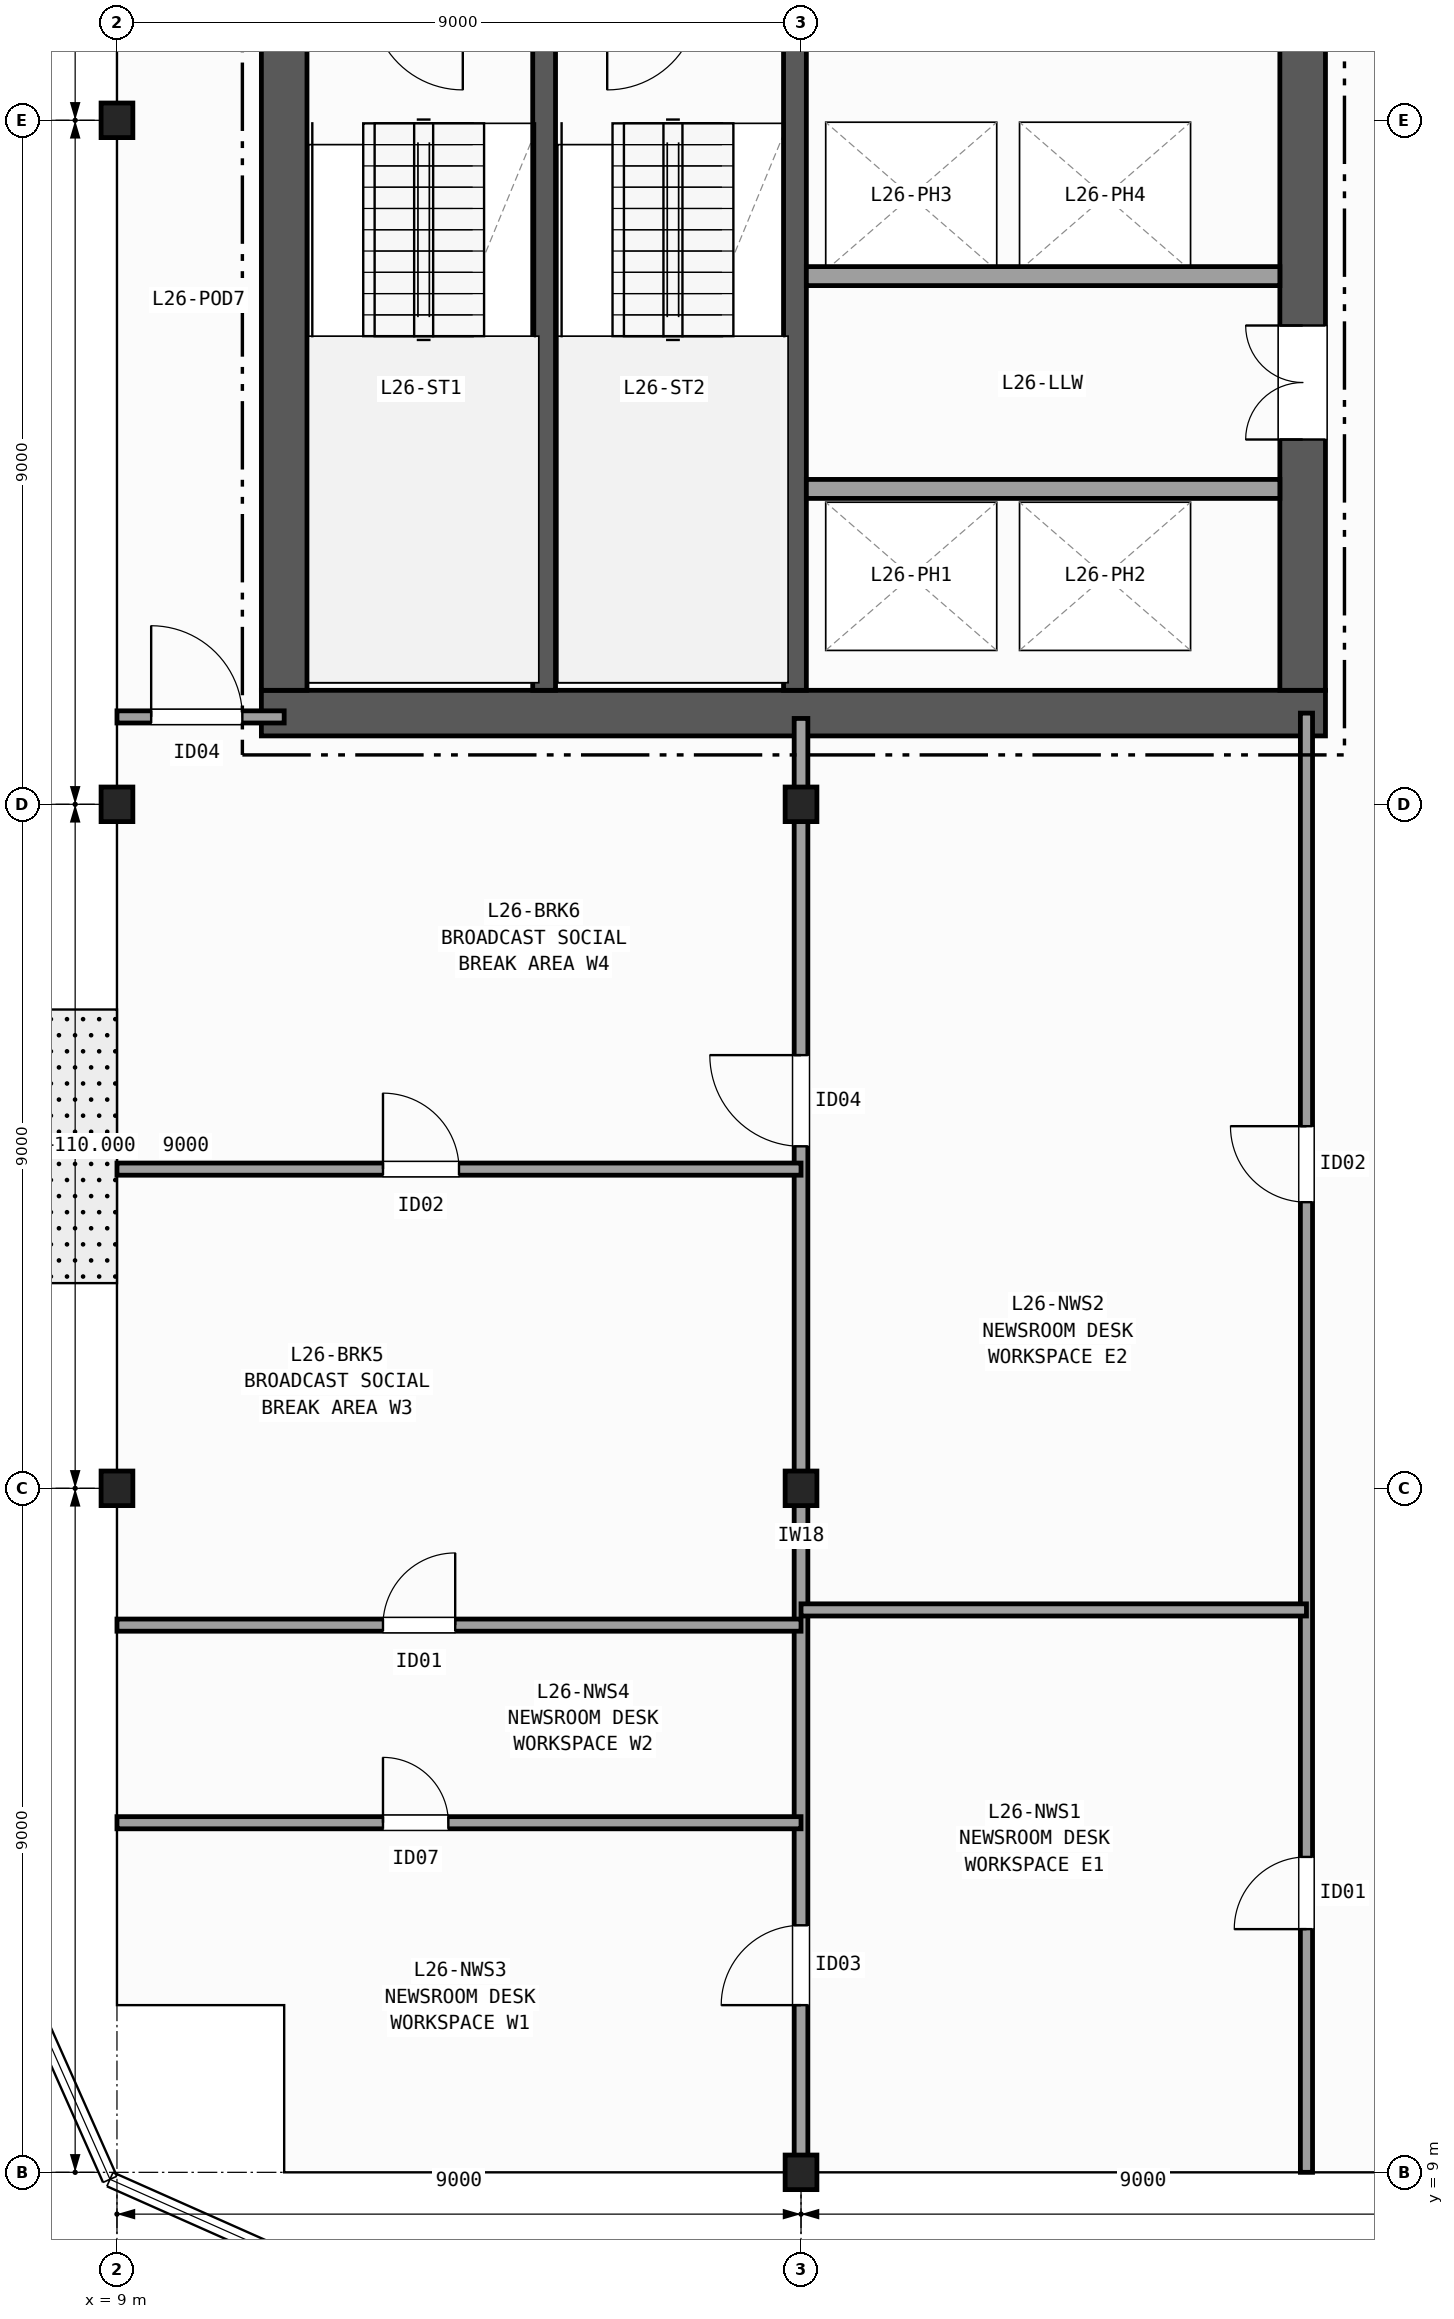
"""IFC4 building model, lengths in metres.
Left out: names, types, materials, properties, quantities, classifications, styles, units other than length and angle.
Written with IfcOpenShell. Run it as: python <this file> out.ifc"""

import sys

from ifc_helpers import new_model, si_unit, direction, frame, frame_2d, origin, origin_2d, place, context, subcontext, project, spatial, rectangle, i_section, extrude, element, fill, save


model = new_model("IFC4")
c1 = context("Model", 3, precision=1e-05, world=origin(), true_north=direction((0.0, 1.0)))
c2 = subcontext(c1, "Body", "Model", "MODEL_VIEW")
j1 = project(units=[si_unit("LENGTHUNIT", "METRE"), si_unit("PLANEANGLEUNIT", "RADIAN")], contexts=[c1])
p1 = place(None, origin())
s1 = spatial("IfcSite", under=j1, at=p1, CompositionType="ELEMENT")
p2 = place(p1, origin())
s2 = spatial("IfcBuilding", under=s1, at=p2, CompositionType="ELEMENT")
p3 = place(p2, frame((0.0, 0.0, 110.0)))
s3 = spatial("IfcBuildingStorey", under=s2, at=p3, CompositionType="ELEMENT", Elevation=110.0)
for number, where, z_axis, x_axis in (
    (1, (9.0, 18.0, 0.0), (0.0, 0.0, 1.0), (1.0, 0.0, 0.0)),
    (2, (9.0, 27.0, 0.0), (0.0, 0.0, 1.0), (1.0, 0.0, 0.0)),
    (3, (9.0, 36.0, 0.0), (0.0, 0.0, 1.0), (1.0, 0.0, 0.0)),
    (4, (18.0, 9.0, 0.0), (0.0, 0.0, 1.0), (1.0, 0.0, 0.0)),
    (5, (18.0, 18.0, 0.0), (0.0, 0.0, 1.0), (1.0, 0.0, 0.0)),
    (6, (18.0, 27.0, 0.0), (0.0, 0.0, 1.0), (1.0, 0.0, 0.0)),
):
    element("IfcColumn", number, at=place(p3, frame(where, z_axis=z_axis, x_axis=x_axis)), inside=s3, PredefinedType="COLUMN", context=c2, shape_type="SweptSolid", body=[
        extrude(i_section(OverallWidth=0.418, OverallDepth=0.455, WebThickness=0.042, FlangeThickness=0.068, FilletRadius=0.015, at=origin_2d()), origin(), (0.0, 0.0, 1.0), 3.7),
    ])
p4 = place(p3, frame((10.9, 28.2, 0.0), z_axis=(0.0, 0.0, 1.0), x_axis=(1.0, 0.0, 0.0)))
e7 = element("IfcWall", 7, at=p4, inside=s3, PredefinedType="SHEAR", context=c2, shape_type="SweptSolid", body=[
    extrude(rectangle(XDim=14.0, YDim=0.6, at=frame_2d((7.0, 0.0))), origin(), (0.0, 0.0, 1.0), 3.42),
])
p5 = place(p3, frame((11.2, 42.1, 0.0), z_axis=(0.0, 0.0, 1.0), x_axis=(0.0, -1.0, 0.0)))
e8 = element("IfcWall", 8, at=p5, inside=s3, PredefinedType="SHEAR", context=c2, shape_type="SweptSolid", body=[
    extrude(rectangle(XDim=13.6, YDim=0.6, at=frame_2d((6.8, 0.0))), origin(), (0.0, 0.0, 1.0), 3.42),
])
p6 = place(p3, frame((24.6, 28.5, 0.0), z_axis=(0.0, 0.0, 1.0), x_axis=(0.0, 1.0, 0.0)))
e9 = element("IfcWall", 9, at=p6, inside=s3, PredefinedType="SHEAR", context=c2, shape_type="SweptSolid", body=[
    extrude(rectangle(XDim=13.6, YDim=0.6, at=frame_2d((6.8, 0.0))), origin(), (0.0, 0.0, 1.0), 3.42),
])
p7 = place(p6, frame((3.3, 0.0, 0.0)))
e10 = element("IfcOpeningElement", 10, at=p7, cuts=e9, PredefinedType="OPENING", context=c2, shape_type="SweptSolid", body=[
    extrude(rectangle(XDim=1.5, YDim=2.2, at=frame_2d((0.75, 1.1))), frame((0.0, 0.31, 0.0), z_axis=(0.0, -1.0, 0.0), x_axis=(1.0, 0.0, 0.0)), (0.0, 0.0, 1.0), 0.62),
])
p8 = place(p6, frame((9.9, 0.0, 0.0)))
e11 = element("IfcOpeningElement", 11, at=p8, cuts=e9, PredefinedType="OPENING", context=c2, shape_type="SweptSolid", body=[
    extrude(rectangle(XDim=0.9, YDim=2.1, at=frame_2d((0.45, 1.05))), frame((0.0, 0.31, 0.0), z_axis=(0.0, -1.0, 0.0), x_axis=(1.0, 0.0, 0.0)), (0.0, 0.0, 1.0), 0.62),
])
p9 = place(p6, frame((12.0, 0.0, 0.0)))
e12 = element("IfcOpeningElement", 12, at=p9, cuts=e9, PredefinedType="OPENING", context=c2, shape_type="SweptSolid", body=[
    extrude(rectangle(XDim=0.9, YDim=2.1, at=frame_2d((0.45, 1.05))), frame((0.0, 0.31, 0.0), z_axis=(0.0, -1.0, 0.0), x_axis=(1.0, 0.0, 0.0)), (0.0, 0.0, 1.0), 0.62),
])
p10 = place(p3, frame((14.62, 28.5, 0.0), z_axis=(0.0, 0.0, 1.0), x_axis=(0.0, 1.0, 0.0)))
e13 = element("IfcWall", 13, at=p10, inside=s3, PredefinedType="SHEAR", context=c2, shape_type="SweptSolid", body=[
    extrude(rectangle(XDim=8.95, YDim=0.3, at=frame_2d((4.475, 0.0))), origin(), (0.0, 0.0, 1.0), 3.42),
])
p11 = place(p3, frame((17.92, 42.1, 0.0), z_axis=(0.0, 0.0, 1.0), x_axis=(0.0, -1.0, 0.0)))
e14 = element("IfcWall", 14, at=p11, inside=s3, PredefinedType="SHEAR", context=c2, shape_type="SweptSolid", body=[
    extrude(rectangle(XDim=13.6, YDim=0.3, at=frame_2d((6.8, 0.0))), origin(), (0.0, 0.0, 1.0), 3.42),
])
p12 = place(p11, frame((1.925, 0.0, 0.0)))
e15 = element("IfcOpeningElement", 15, at=p12, cuts=e14, PredefinedType="OPENING", context=c2, shape_type="SweptSolid", body=[
    extrude(rectangle(XDim=1.15, YDim=2.15, at=frame_2d((0.575, 1.075))), frame((0.0, 0.16, 0.0), z_axis=(0.0, -1.0, 0.0), x_axis=(1.0, 0.0, 0.0)), (0.0, 0.0, 1.0), 0.32),
])
for number, where, z_axis, x_axis in (
    (16, (18.07, 31.15, 0.0), (0.0, 0.0, 1.0), (1.0, 0.0, 0.0)),
    (17, (24.3, 33.95, 0.0), (0.0, 0.0, 1.0), (-1.0, 0.0, 0.0)),
):
    element("IfcWall", number, at=place(p3, frame(where, z_axis=z_axis, x_axis=x_axis)), inside=s3, PredefinedType="PARTITIONING", context=c2, shape_type="SweptSolid", body=[
        extrude(rectangle(XDim=6.23, YDim=0.25, at=frame_2d((3.115, 0.0))), origin(), (0.0, 0.0, 1.0), 3.42),
    ])
p13 = place(p3, frame((9.0, 28.15, 0.0), z_axis=(0.0, 0.0, 1.0), x_axis=(1.0, 0.0, 0.0)))
e18 = element("IfcWall", 18, at=p13, inside=s3, PredefinedType="PARTITIONING", context=c2, shape_type="SweptSolid", body=[
    extrude(rectangle(XDim=2.2, YDim=0.16, at=frame_2d((1.1, 0.0))), origin(), (0.0, 0.0, 1.0), 2.634),
])
p14 = place(p13, frame((0.45, 0.0, 0.0)))
e19 = element("IfcOpeningElement", 19, at=p14, cuts=e18, PredefinedType="OPENING", context=c2, shape_type="SweptSolid", body=[
    extrude(rectangle(XDim=1.2, YDim=2.15, at=frame_2d((0.6, 1.075))), frame((0.0, 0.09, 0.0), z_axis=(0.0, -1.0, 0.0), x_axis=(1.0, 0.0, 0.0)), (0.0, 0.0, 1.0), 0.18),
])
p15 = place(p3, frame((24.65, 9.0, 0.0), z_axis=(0.0, 0.0, 1.0), x_axis=(0.0, 1.0, 0.0)))
e20 = element("IfcWall", 20, at=p15, inside=s3, PredefinedType="PARTITIONING", context=c2, shape_type="SweptSolid", body=[
    extrude(rectangle(XDim=19.2, YDim=0.16, at=frame_2d((9.6, 0.0))), origin(), (0.0, 0.0, 1.0), 2.634),
])
p16 = place(p15, frame((3.2, 0.0, 0.0)))
e21 = element("IfcOpeningElement", 21, at=p16, cuts=e20, PredefinedType="OPENING", context=c2, shape_type="SweptSolid", body=[
    extrude(rectangle(XDim=0.95, YDim=2.1, at=frame_2d((0.475, 1.05))), frame((0.0, 0.09, 0.0), z_axis=(0.0, -1.0, 0.0), x_axis=(1.0, 0.0, 0.0)), (0.0, 0.0, 1.0), 0.18),
])
p17 = place(p15, frame((12.765, 0.0, 0.0)))
e22 = element("IfcOpeningElement", 22, at=p17, cuts=e20, PredefinedType="OPENING", context=c2, shape_type="SweptSolid", body=[
    extrude(rectangle(XDim=1.0, YDim=2.1, at=frame_2d((0.5, 1.05))), frame((0.0, 0.09, 0.0), z_axis=(0.0, -1.0, 0.0), x_axis=(1.0, 0.0, 0.0)), (0.0, 0.0, 1.0), 0.18),
])
p18 = place(p3, frame((18.0, 9.0, 0.0), z_axis=(0.0, 0.0, 1.0), x_axis=(0.0, 1.0, 0.0)))
e23 = element("IfcWall", 23, at=p18, inside=s3, PredefinedType="PARTITIONING", context=c2, shape_type="SweptSolid", body=[
    extrude(rectangle(XDim=19.13, YDim=0.18, at=frame_2d((9.565, 0.0))), origin(), (0.0, 0.0, 1.0), 2.634),
])
p19 = place(p18, frame((2.2, 0.0, 0.0)))
e24 = element("IfcOpeningElement", 24, at=p19, cuts=e23, PredefinedType="OPENING", context=c2, shape_type="SweptSolid", body=[
    extrude(rectangle(XDim=1.05, YDim=2.15, at=frame_2d((0.525, 1.075))), frame((0.0, 0.1, 0.0), z_axis=(0.0, -1.0, 0.0), x_axis=(1.0, 0.0, 0.0)), (0.0, 0.0, 1.0), 0.2),
])
p20 = place(p18, frame((13.5, 0.0, 0.0)))
e25 = element("IfcOpeningElement", 25, at=p20, cuts=e23, PredefinedType="OPENING", context=c2, shape_type="SweptSolid", body=[
    extrude(rectangle(XDim=1.2, YDim=2.15, at=frame_2d((0.6, 1.075))), frame((0.0, 0.1, 0.0), z_axis=(0.0, -1.0, 0.0), x_axis=(1.0, 0.0, 0.0)), (0.0, 0.0, 1.0), 0.2),
])
p21 = place(p3, frame((18.0, 16.4, 0.0), z_axis=(0.0, 0.0, 1.0), x_axis=(1.0, 0.0, 0.0)))
e26 = element("IfcWall", 26, at=p21, inside=s3, PredefinedType="PARTITIONING", context=c2, shape_type="SweptSolid", body=[
    extrude(rectangle(XDim=6.65, YDim=0.16, at=frame_2d((3.325, 0.0))), origin(), (0.0, 0.0, 1.0), 2.789),
])
p22 = place(p3, frame((9.0, 13.6, 0.0), z_axis=(0.0, 0.0, 1.0), x_axis=(1.0, 0.0, 0.0)))
e27 = element("IfcWall", 27, at=p22, inside=s3, PredefinedType="PARTITIONING", context=c2, shape_type="SweptSolid", body=[
    extrude(rectangle(XDim=9.0, YDim=0.16, at=frame_2d((4.5, 0.0))), origin(), (0.0, 0.0, 1.0), 2.792),
])
p23 = place(p22, frame((3.5, 0.0, 0.0)))
e28 = element("IfcOpeningElement", 28, at=p23, cuts=e27, PredefinedType="OPENING", context=c2, shape_type="SweptSolid", body=[
    extrude(rectangle(XDim=0.86, YDim=2.05, at=frame_2d((0.43, 1.025))), frame((0.0, 0.09, 0.0), z_axis=(0.0, -1.0, 0.0), x_axis=(1.0, 0.0, 0.0)), (0.0, 0.0, 1.0), 0.18),
])
p24 = place(p3, frame((9.0, 16.2, 0.0), z_axis=(0.0, 0.0, 1.0), x_axis=(1.0, 0.0, 0.0)))
e29 = element("IfcWall", 29, at=p24, inside=s3, PredefinedType="PARTITIONING", context=c2, shape_type="SweptSolid", body=[
    extrude(rectangle(XDim=9.0, YDim=0.16, at=frame_2d((4.5, 0.0))), origin(), (0.0, 0.0, 1.0), 2.792),
])
p25 = place(p24, frame((3.5, 0.0, 0.0)))
e30 = element("IfcOpeningElement", 30, at=p25, cuts=e29, PredefinedType="OPENING", context=c2, shape_type="SweptSolid", body=[
    extrude(rectangle(XDim=0.95, YDim=2.1, at=frame_2d((0.475, 1.05))), frame((0.0, 0.09, 0.0), z_axis=(0.0, -1.0, 0.0), x_axis=(1.0, 0.0, 0.0)), (0.0, 0.0, 1.0), 0.18),
])
p26 = place(p3, frame((9.0, 22.2, 0.0), z_axis=(0.0, 0.0, 1.0), x_axis=(1.0, 0.0, 0.0)))
e31 = element("IfcWall", 31, at=p26, inside=s3, PredefinedType="PARTITIONING", context=c2, shape_type="SweptSolid", body=[
    extrude(rectangle(XDim=9.0, YDim=0.16, at=frame_2d((4.5, 0.0))), origin(), (0.0, 0.0, 1.0), 2.634),
])
p27 = place(p26, frame((3.5, 0.0, 0.0)))
e32 = element("IfcOpeningElement", 32, at=p27, cuts=e31, PredefinedType="OPENING", context=c2, shape_type="SweptSolid", body=[
    extrude(rectangle(XDim=1.0, YDim=2.1, at=frame_2d((0.5, 1.05))), frame((0.0, 0.09, 0.0), z_axis=(0.0, -1.0, 0.0), x_axis=(1.0, 0.0, 0.0)), (0.0, 0.0, 1.0), 0.18),
])
p28 = place(p7, origin())
e33 = element("IfcDoor", 33, at=p28, inside=s3, OperationType="DOUBLE_DOOR_SINGLE_SWING", PredefinedType="DOOR", context=c2, shape_type="SweptSolid", body=[
    extrude(rectangle(XDim=1.5, YDim=2.2, at=frame_2d((0.75, 1.1))), frame((0.0, 0.025, 0.0), z_axis=(0.0, -1.0, 0.0), x_axis=(1.0, 0.0, 0.0)), (0.0, 0.0, 1.0), 0.05),
])
fill(e10, e33)
p29 = place(p14, origin())
e34 = element("IfcDoor", 34, at=p29, inside=s3, OperationType="SINGLE_SWING_LEFT", PredefinedType="DOOR", context=c2, shape_type="SweptSolid", body=[
    extrude(rectangle(XDim=1.2, YDim=2.15, at=frame_2d((0.6, 1.075))), frame((0.0, 0.025, 0.0), z_axis=(0.0, -1.0, 0.0), x_axis=(1.0, 0.0, 0.0)), (0.0, 0.0, 1.0), 0.05),
])
fill(e19, e34)
p30 = place(p16, origin())
e35 = element("IfcDoor", 35, at=p30, inside=s3, OperationType="SINGLE_SWING_LEFT", PredefinedType="DOOR", context=c2, shape_type="SweptSolid", body=[
    extrude(rectangle(XDim=0.95, YDim=2.1, at=frame_2d((0.475, 1.05))), frame((0.0, 0.025, 0.0), z_axis=(0.0, -1.0, 0.0), x_axis=(1.0, 0.0, 0.0)), (0.0, 0.0, 1.0), 0.05),
])
fill(e21, e35)
p31 = place(p17, origin())
e36 = element("IfcDoor", 36, at=p31, inside=s3, OperationType="SINGLE_SWING_RIGHT", PredefinedType="DOOR", context=c2, shape_type="SweptSolid", body=[
    extrude(rectangle(XDim=1.0, YDim=2.1, at=frame_2d((0.5, 1.05))), frame((0.0, 0.025, 0.0), z_axis=(0.0, -1.0, 0.0), x_axis=(1.0, 0.0, 0.0)), (0.0, 0.0, 1.0), 0.05),
])
fill(e22, e36)
p32 = place(p19, origin())
e37 = element("IfcDoor", 37, at=p32, inside=s3, OperationType="SINGLE_SWING_LEFT", PredefinedType="DOOR", context=c2, shape_type="SweptSolid", body=[
    extrude(rectangle(XDim=1.05, YDim=2.15, at=frame_2d((0.525, 1.075))), frame((0.0, 0.025, 0.0), z_axis=(0.0, -1.0, 0.0), x_axis=(1.0, 0.0, 0.0)), (0.0, 0.0, 1.0), 0.05),
])
fill(e24, e37)
p33 = place(p20, origin())
e38 = element("IfcDoor", 38, at=p33, inside=s3, OperationType="SINGLE_SWING_RIGHT", PredefinedType="DOOR", context=c2, shape_type="SweptSolid", body=[
    extrude(rectangle(XDim=1.2, YDim=2.15, at=frame_2d((0.6, 1.075))), frame((0.0, 0.025, 0.0), z_axis=(0.0, -1.0, 0.0), x_axis=(1.0, 0.0, 0.0)), (0.0, 0.0, 1.0), 0.05),
])
fill(e25, e38)
p34 = place(p23, origin())
e39 = element("IfcDoor", 39, at=p34, inside=s3, OperationType="SINGLE_SWING_LEFT", PredefinedType="DOOR", context=c2, shape_type="SweptSolid", body=[
    extrude(rectangle(XDim=0.86, YDim=2.05, at=frame_2d((0.43, 1.025))), frame((0.0, 0.025, 0.0), z_axis=(0.0, -1.0, 0.0), x_axis=(1.0, 0.0, 0.0)), (0.0, 0.0, 1.0), 0.05),
])
fill(e28, e39)
p35 = place(p25, origin())
e40 = element("IfcDoor", 40, at=p35, inside=s3, OperationType="SINGLE_SWING_RIGHT", PredefinedType="DOOR", context=c2, shape_type="SweptSolid", body=[
    extrude(rectangle(XDim=0.95, YDim=2.1, at=frame_2d((0.475, 1.05))), frame((0.0, 0.025, 0.0), z_axis=(0.0, -1.0, 0.0), x_axis=(1.0, 0.0, 0.0)), (0.0, 0.0, 1.0), 0.05),
])
fill(e30, e40)
p36 = place(p27, origin())
e41 = element("IfcDoor", 41, at=p36, inside=s3, OperationType="SINGLE_SWING_LEFT", PredefinedType="DOOR", context=c2, shape_type="SweptSolid", body=[
    extrude(rectangle(XDim=1.0, YDim=2.1, at=frame_2d((0.5, 1.05))), frame((0.0, 0.025, 0.0), z_axis=(0.0, -1.0, 0.0), x_axis=(1.0, 0.0, 0.0)), (0.0, 0.0, 1.0), 0.05),
])
fill(e32, e41)
save(model, sys.argv[1])
